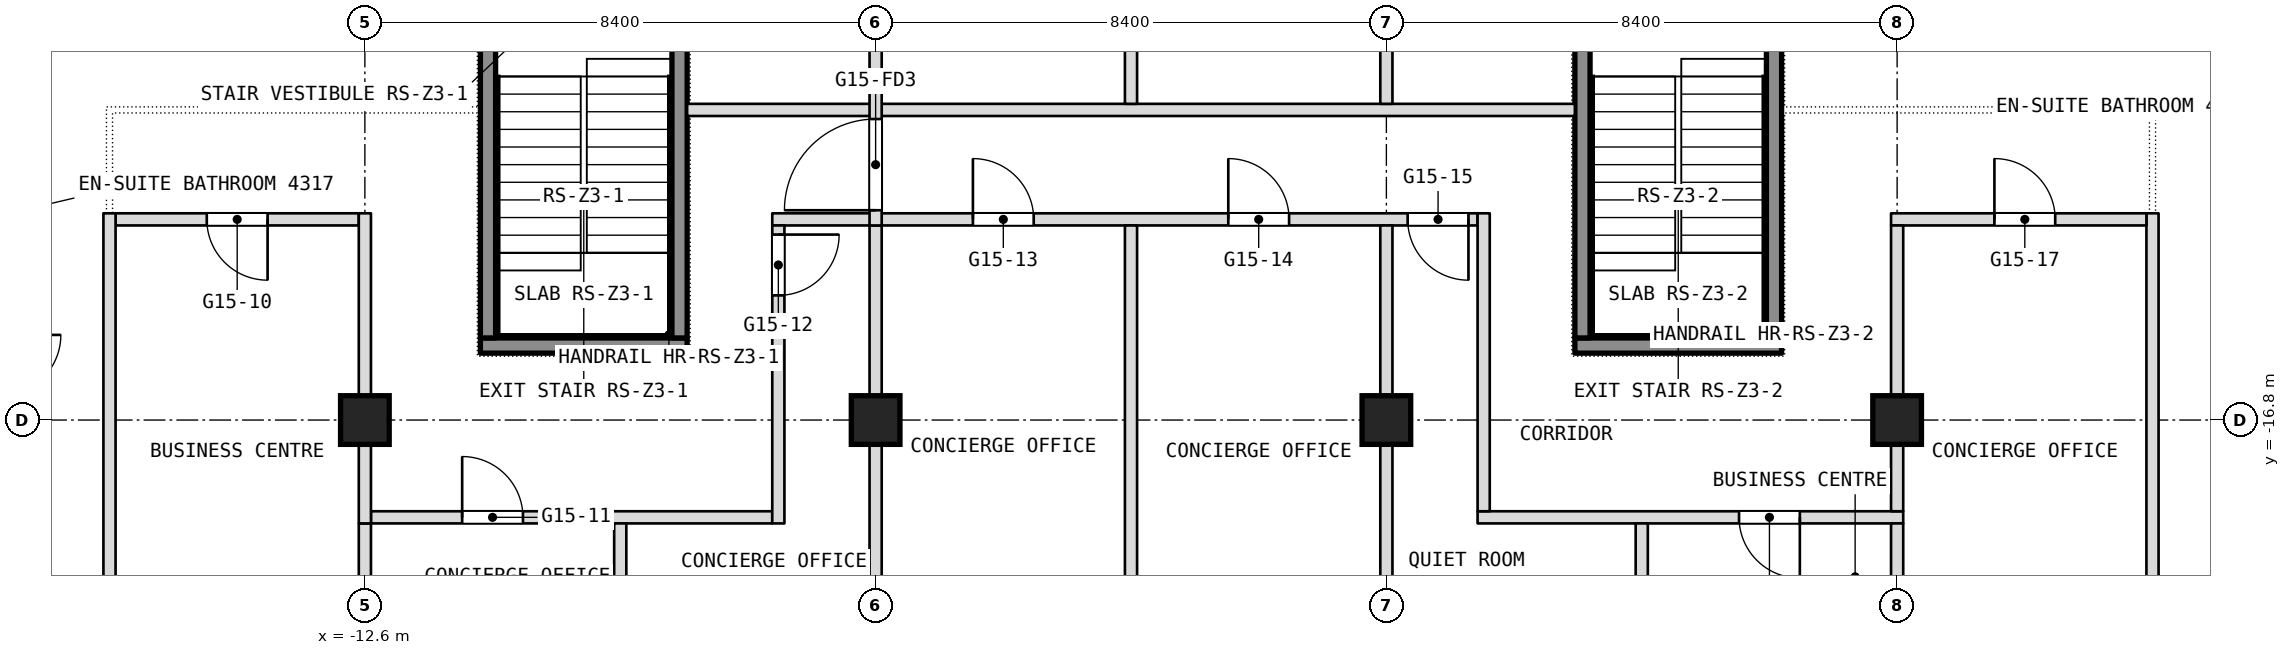
"""IFC4 building model, lengths in metres.
Left out: names, types, materials, properties, quantities, classifications, styles, units other than length and angle.
Written with IfcOpenShell. Run it as: python <this file> out.ifc"""

import sys

from ifc_helpers import new_model, si_unit, direction, frame, frame_2d, origin, origin_2d, place, context, subcontext, project, spatial, rectangle, extrude, element, fill, save


model = new_model("IFC4")
c1 = context("Model", 3, precision=1e-05, world=origin(), true_north=direction((0.0, 1.0)))
c2 = subcontext(c1, "Body", "Model", "MODEL_VIEW")
j1 = project(units=[si_unit("LENGTHUNIT", "METRE"), si_unit("PLANEANGLEUNIT", "RADIAN")], contexts=[c1])
p1 = place(None, origin())
s1 = spatial("IfcSite", under=j1, at=p1, CompositionType="ELEMENT")
p2 = place(p1, origin())
s2 = spatial("IfcBuilding", under=s1, at=p2, CompositionType="ELEMENT")
p3 = place(p2, frame((0.0, 0.0, 191.3)))
s3 = spatial("IfcBuildingStorey", under=s2, at=p3, CompositionType="ELEMENT", Elevation=191.3)
for number, where, z_axis, x_axis in (
    (1, (-12.6, -16.8, 0.0), (0.0, 0.0, 1.0), (1.0, 0.0, 0.0)),
    (2, (-4.2, -16.8, 0.0), (0.0, 0.0, 1.0), (1.0, 0.0, 0.0)),
    (3, (4.2, -16.8, 0.0), (0.0, 0.0, 1.0), (1.0, 0.0, 0.0)),
    (4, (12.6, -16.8, 0.0), (0.0, 0.0, 1.0), (1.0, 0.0, 0.0)),
):
    element("IfcColumn", number, at=place(p3, frame(where, z_axis=z_axis, x_axis=x_axis)), inside=s3, PredefinedType="COLUMN", context=c2, shape_type="SweptSolid", body=[
        extrude(rectangle(XDim=0.8, YDim=0.8, at=origin_2d()), origin(), (0.0, 0.0, 1.0), 3.6),
    ])
p4 = place(p3, frame((-12.5, -18.4, 0.0), z_axis=(0.0, 0.0, 1.0), x_axis=(1.0, 0.0, 0.0)))
e5 = element("IfcWall", 5, at=p4, inside=s3, PredefinedType="PARTITIONING", context=c2, shape_type="SweptSolid", body=[
    extrude(rectangle(XDim=6.6, YDim=0.2, at=frame_2d((3.3, 0.0))), origin(), (0.0, 0.0, 1.0), 3.34),
])
p5 = place(p4, frame((1.5, 0.0, 0.0)))
e6 = element("IfcOpeningElement", 6, at=p5, cuts=e5, PredefinedType="OPENING", context=c2, shape_type="SweptSolid", body=[
    extrude(rectangle(XDim=1.0, YDim=2.1, at=frame_2d((0.5, 1.05))), frame((0.0, 0.1, 0.0), z_axis=(0.0, -1.0, 0.0), x_axis=(1.0, 0.0, 0.0)), (0.0, 0.0, 1.0), 0.2),
])
p6 = place(p3, frame((5.7, -18.4, 0.0), z_axis=(0.0, 0.0, 1.0), x_axis=(1.0, 0.0, 0.0)))
e7 = element("IfcWall", 7, at=p6, inside=s3, PredefinedType="PARTITIONING", context=c2, shape_type="SweptSolid", body=[
    extrude(rectangle(XDim=7.0, YDim=0.2, at=frame_2d((3.5, 0.0))), origin(), (0.0, 0.0, 1.0), 3.34),
])
p7 = place(p6, frame((4.3, 0.0, 0.0)))
e8 = element("IfcOpeningElement", 8, at=p7, cuts=e7, PredefinedType="OPENING", context=c2, shape_type="SweptSolid", body=[
    extrude(rectangle(XDim=1.0, YDim=2.1, at=frame_2d((0.5, 1.05))), frame((0.0, 0.1, 0.0), z_axis=(0.0, -1.0, 0.0), x_axis=(1.0, 0.0, 0.0)), (0.0, 0.0, 1.0), 0.2),
])
p8 = place(p3, frame((16.8, -20.2, 0.0), z_axis=(0.0, 0.0, 1.0), x_axis=(0.0, 1.0, 0.0)))
e9 = element("IfcWall", 9, at=p8, inside=s3, PredefinedType="PARTITIONING", context=c2, shape_type="SweptSolid", body=[
    extrude(rectangle(XDim=6.8, YDim=0.2, at=frame_2d((3.4, 0.0))), origin(), (0.0, 0.0, 1.0), 3.34),
])
p9 = place(p3, frame((-16.7, -13.5, 0.0), z_axis=(0.0, 0.0, 1.0), x_axis=(1.0, 0.0, 0.0)))
e10 = element("IfcWall", 10, at=p9, inside=s3, PredefinedType="PARTITIONING", context=c2, shape_type="SweptSolid", body=[
    extrude(rectangle(XDim=4.0, YDim=0.2, at=frame_2d((2.0, 0.0))), origin(), (0.0, 0.0, 1.0), 3.34),
])
p10 = place(p9, frame((1.5, 0.0, 0.0)))
e11 = element("IfcOpeningElement", 11, at=p10, cuts=e10, PredefinedType="OPENING", context=c2, shape_type="SweptSolid", body=[
    extrude(rectangle(XDim=1.0, YDim=2.1, at=frame_2d((0.5, 1.05))), frame((0.0, 0.1, 0.0), z_axis=(0.0, -1.0, 0.0), x_axis=(1.0, 0.0, 0.0)), (0.0, 0.0, 1.0), 0.2),
])
p11 = place(p3, frame((-5.9, -13.5, 0.0), z_axis=(0.0, 0.0, 1.0), x_axis=(1.0, 0.0, 0.0)))
e12 = element("IfcWall", 12, at=p11, inside=s3, PredefinedType="PARTITIONING", context=c2, shape_type="SweptSolid", body=[
    extrude(rectangle(XDim=11.6, YDim=0.2, at=frame_2d((5.8, 0.0))), origin(), (0.0, 0.0, 1.0), 3.34),
])
p12 = place(p11, frame((3.3, 0.0, 0.0)))
e13 = element("IfcOpeningElement", 13, at=p12, cuts=e12, PredefinedType="OPENING", context=c2, shape_type="SweptSolid", body=[
    extrude(rectangle(XDim=1.0, YDim=2.1, at=frame_2d((0.5, 1.05))), frame((0.0, 0.1, 0.0), z_axis=(0.0, -1.0, 0.0), x_axis=(1.0, 0.0, 0.0)), (0.0, 0.0, 1.0), 0.2),
])
p13 = place(p11, frame((7.5, 0.0, 0.0)))
e14 = element("IfcOpeningElement", 14, at=p13, cuts=e12, PredefinedType="OPENING", context=c2, shape_type="SweptSolid", body=[
    extrude(rectangle(XDim=1.0, YDim=2.1, at=frame_2d((0.5, 1.05))), frame((0.0, 0.1, 0.0), z_axis=(0.0, -1.0, 0.0), x_axis=(1.0, 0.0, 0.0)), (0.0, 0.0, 1.0), 0.2),
])
p14 = place(p11, frame((10.45, 0.0, 0.0)))
e15 = element("IfcOpeningElement", 15, at=p14, cuts=e12, PredefinedType="OPENING", context=c2, shape_type="SweptSolid", body=[
    extrude(rectangle(XDim=1.0, YDim=2.1, at=frame_2d((0.5, 1.05))), frame((0.0, 0.1, 0.0), z_axis=(0.0, -1.0, 0.0), x_axis=(1.0, 0.0, 0.0)), (0.0, 0.0, 1.0), 0.2),
])
p15 = place(p3, frame((12.5, -13.5, 0.0), z_axis=(0.0, 0.0, 1.0), x_axis=(1.0, 0.0, 0.0)))
e16 = element("IfcWall", 16, at=p15, inside=s3, PredefinedType="PARTITIONING", context=c2, shape_type="SweptSolid", body=[
    extrude(rectangle(XDim=4.2, YDim=0.2, at=frame_2d((2.1, 0.0))), origin(), (0.0, 0.0, 1.0), 3.34),
])
p16 = place(p15, frame((1.7, 0.0, 0.0)))
e17 = element("IfcOpeningElement", 17, at=p16, cuts=e16, PredefinedType="OPENING", context=c2, shape_type="SweptSolid", body=[
    extrude(rectangle(XDim=1.0, YDim=2.1, at=frame_2d((0.5, 1.05))), frame((0.0, 0.1, 0.0), z_axis=(0.0, -1.0, 0.0), x_axis=(1.0, 0.0, 0.0)), (0.0, 0.0, 1.0), 0.2),
])
p17 = place(p3, frame((12.6, -20.0, 0.0), z_axis=(0.0, 0.0, 1.0), x_axis=(0.0, 1.0, 0.0)))
e18 = element("IfcWall", 18, at=p17, inside=s3, PredefinedType="PARTITIONING", context=c2, shape_type="SweptSolid", body=[
    extrude(rectangle(XDim=1.5, YDim=0.2, at=frame_2d((0.75, 0.0))), origin(), (0.0, 0.0, 1.0), 3.34),
])
p18 = place(p3, frame((12.6, -18.3, 0.0), z_axis=(0.0, 0.0, 1.0), x_axis=(0.0, 1.0, 0.0)))
e19 = element("IfcWall", 19, at=p18, inside=s3, PredefinedType="PARTITIONING", context=c2, shape_type="SweptSolid", body=[
    extrude(rectangle(XDim=4.7, YDim=0.2, at=frame_2d((2.35, 0.0))), origin(), (0.0, 0.0, 1.0), 3.34),
])
p19 = place(p3, frame((-7.3, -11.7, 0.0), z_axis=(0.0, 0.0, 1.0), x_axis=(1.0, 0.0, 0.0)))
e20 = element("IfcWall", 20, at=p19, inside=s3, PredefinedType="PARTITIONING", context=c2, shape_type="SweptSolid", body=[
    extrude(rectangle(XDim=14.6, YDim=0.2, at=frame_2d((7.3, 0.0))), origin(), (0.0, 0.0, 1.0), 3.34),
])
p20 = place(p3, frame((8.4, -20.0, 0.0), z_axis=(0.0, 0.0, 1.0), x_axis=(0.0, 1.0, 0.0)))
e21 = element("IfcWall", 21, at=p20, inside=s3, PredefinedType="PARTITIONING", context=c2, shape_type="SweptSolid", body=[
    extrude(rectangle(XDim=1.5, YDim=0.2, at=frame_2d((0.75, 0.0))), origin(), (0.0, 0.0, 1.0), 3.34),
])
p21 = place(p3, frame((5.8, -18.3, 0.0), z_axis=(0.0, 0.0, 1.0), x_axis=(0.0, 1.0, 0.0)))
e22 = element("IfcWall", 22, at=p21, inside=s3, PredefinedType="PARTITIONING", context=c2, shape_type="SweptSolid", body=[
    extrude(rectangle(XDim=4.9, YDim=0.2, at=frame_2d((2.45, 0.0))), origin(), (0.0, 0.0, 1.0), 3.34),
])
p22 = place(p3, frame((4.2, -20.0, 0.0), z_axis=(0.0, 0.0, 1.0), x_axis=(0.0, 1.0, 0.0)))
e23 = element("IfcWall", 23, at=p22, inside=s3, PredefinedType="PARTITIONING", context=c2, shape_type="SweptSolid", body=[
    extrude(rectangle(XDim=6.4, YDim=0.2, at=frame_2d((3.2, 0.0))), origin(), (0.0, 0.0, 1.0), 3.34),
])
p23 = place(p3, frame((4.2, -11.6, 0.0), z_axis=(0.0, 0.0, 1.0), x_axis=(0.0, 1.0, 0.0)))
e24 = element("IfcWall", 24, at=p23, inside=s3, PredefinedType="PARTITIONING", context=c2, shape_type="SweptSolid", body=[
    extrude(rectangle(XDim=9.7, YDim=0.2, at=frame_2d((4.85, 0.0))), origin(), (0.0, 0.0, 1.0), 3.34),
])
p24 = place(p3, frame((0.0, -20.0, 0.0), z_axis=(0.0, 0.0, 1.0), x_axis=(0.0, 1.0, 0.0)))
e25 = element("IfcWall", 25, at=p24, inside=s3, PredefinedType="PARTITIONING", context=c2, shape_type="SweptSolid", body=[
    extrude(rectangle(XDim=6.4, YDim=0.2, at=frame_2d((3.2, 0.0))), origin(), (0.0, 0.0, 1.0), 3.34),
])
p25 = place(p3, frame((0.0, -11.6, 0.0), z_axis=(0.0, 0.0, 1.0), x_axis=(0.0, 1.0, 0.0)))
e26 = element("IfcWall", 26, at=p25, inside=s3, PredefinedType="PARTITIONING", context=c2, shape_type="SweptSolid", body=[
    extrude(rectangle(XDim=9.7, YDim=0.2, at=frame_2d((4.85, 0.0))), origin(), (0.0, 0.0, 1.0), 3.34),
])
p26 = place(p3, frame((-4.2, -22.0, 0.0), z_axis=(0.0, 0.0, 1.0), x_axis=(0.0, 1.0, 0.0)))
e27 = element("IfcWall", 27, at=p26, inside=s3, PredefinedType="PARTITIONING", context=c2, shape_type="SweptSolid", body=[
    extrude(rectangle(XDim=8.4, YDim=0.2, at=frame_2d((4.2, 0.0))), origin(), (0.0, 0.0, 1.0), 3.34),
])
p27 = place(p26, frame((0.25, 0.0, 0.0)))
e28 = element("IfcOpeningElement", 28, at=p27, cuts=e27, PredefinedType="OPENING", context=c2, shape_type="SweptSolid", body=[
    extrude(rectangle(XDim=1.5, YDim=2.1, at=frame_2d((0.75, 1.05))), frame((0.0, 0.1, 0.0), z_axis=(0.0, -1.0, 0.0), x_axis=(1.0, 0.0, 0.0)), (0.0, 0.0, 1.0), 0.2),
])
p28 = place(p3, frame((-4.2, -13.6, 0.0), z_axis=(0.0, 0.0, 1.0), x_axis=(0.0, 1.0, 0.0)))
e29 = element("IfcWall", 29, at=p28, inside=s3, PredefinedType="PARTITIONING", context=c2, shape_type="SweptSolid", body=[
    extrude(rectangle(XDim=13.6, YDim=0.2, at=frame_2d((6.8, 0.0))), origin(), (0.0, 0.0, 1.0), 3.34),
])
p29 = place(p28, frame((11.95, 0.0, 0.0)))
e30 = element("IfcOpeningElement", 30, at=p29, cuts=e29, PredefinedType="OPENING", context=c2, shape_type="SweptSolid", body=[
    extrude(rectangle(XDim=1.5, YDim=2.1, at=frame_2d((0.75, 1.05))), frame((0.0, 0.1, 0.0), z_axis=(0.0, -1.0, 0.0), x_axis=(1.0, 0.0, 0.0)), (0.0, 0.0, 1.0), 0.2),
])
p30 = place(p28, frame((0.25, 0.0, 0.0)))
e31 = element("IfcOpeningElement", 31, at=p30, cuts=e29, PredefinedType="OPENING", context=c2, shape_type="SweptSolid", body=[
    extrude(rectangle(XDim=1.5, YDim=2.1, at=frame_2d((0.75, 1.05))), frame((0.0, 0.1, 0.0), z_axis=(0.0, -1.0, 0.0), x_axis=(1.0, 0.0, 0.0)), (0.0, 0.0, 1.0), 0.2),
])
p31 = place(p3, frame((-5.8, -18.5, 0.0), z_axis=(0.0, 0.0, 1.0), x_axis=(0.0, 1.0, 0.0)))
e32 = element("IfcWall", 32, at=p31, inside=s3, PredefinedType="PARTITIONING", context=c2, shape_type="SweptSolid", body=[
    extrude(rectangle(XDim=4.9, YDim=0.2, at=frame_2d((2.45, 0.0))), origin(), (0.0, 0.0, 1.0), 3.34),
])
p32 = place(p31, frame((3.75, 0.0, 0.0)))
e33 = element("IfcOpeningElement", 33, at=p32, cuts=e32, PredefinedType="OPENING", context=c2, shape_type="SweptSolid", body=[
    extrude(rectangle(XDim=1.0, YDim=2.1, at=frame_2d((0.5, 1.05))), frame((0.0, 0.1, 0.0), z_axis=(0.0, -1.0, 0.0), x_axis=(1.0, 0.0, 0.0)), (0.0, 0.0, 1.0), 0.2),
])
for number, where, z_axis, x_axis in (
    (34, (-8.4, -20.0, 0.0), (0.0, 0.0, 1.0), (0.0, 1.0, 0.0)),
    (35, (-12.6, -20.0, 0.0), (0.0, 0.0, 1.0), (0.0, 1.0, 0.0)),
):
    element("IfcWall", number, at=place(p3, frame(where, z_axis=z_axis, x_axis=x_axis)), inside=s3, PredefinedType="PARTITIONING", context=c2, shape_type="SweptSolid", body=[
        extrude(rectangle(XDim=1.5, YDim=0.2, at=frame_2d((0.75, 0.0))), origin(), (0.0, 0.0, 1.0), 3.34),
    ])
p33 = place(p3, frame((-12.6, -18.5, 0.0), z_axis=(0.0, 0.0, 1.0), x_axis=(0.0, 1.0, 0.0)))
e36 = element("IfcWall", 36, at=p33, inside=s3, PredefinedType="PARTITIONING", context=c2, shape_type="SweptSolid", body=[
    extrude(rectangle(XDim=5.1, YDim=0.2, at=frame_2d((2.55, 0.0))), origin(), (0.0, 0.0, 1.0), 3.34),
])
p34 = place(p3, frame((-16.8, -20.2, 0.0), z_axis=(0.0, 0.0, 1.0), x_axis=(0.0, 1.0, 0.0)))
e37 = element("IfcWall", 37, at=p34, inside=s3, PredefinedType="PARTITIONING", context=c2, shape_type="SweptSolid", body=[
    extrude(rectangle(XDim=6.8, YDim=0.2, at=frame_2d((3.4, 0.0))), origin(), (0.0, 0.0, 1.0), 3.34),
])
p35 = place(p3, frame((-10.7, -15.575, 0.1), z_axis=(0.0, 0.0, 1.0), x_axis=(1.0, 0.0, 0.0)))
e38 = element("IfcWall", 38, at=p35, inside=s3, PredefinedType="SHEAR", context=c2, shape_type="SweptSolid", body=[
    extrude(rectangle(XDim=3.4, YDim=0.25, at=frame_2d((1.7, 0.0))), origin(), (0.0, 0.0, 1.0), 3.6),
])
for number, where, z_axis, x_axis in (
    (39, (-10.575, -15.45, 0.1), (0.0, 0.0, 1.0), (0.0, 1.0, 0.0)),
    (40, (-7.425, -15.45, 0.1), (0.0, 0.0, 1.0), (0.0, 1.0, 0.0)),
):
    element("IfcWall", number, at=place(p3, frame(where, z_axis=z_axis, x_axis=x_axis)), inside=s3, PredefinedType="SHEAR", context=c2, shape_type="SweptSolid", body=[
        extrude(rectangle(XDim=5.7, YDim=0.25, at=frame_2d((2.85, 0.0))), origin(), (0.0, 0.0, 1.0), 3.6),
    ])
p36 = place(p3, frame((7.3, -15.575, 0.1), z_axis=(0.0, 0.0, 1.0), x_axis=(1.0, 0.0, 0.0)))
e41 = element("IfcWall", 41, at=p36, inside=s3, PredefinedType="SHEAR", context=c2, shape_type="SweptSolid", body=[
    extrude(rectangle(XDim=3.4, YDim=0.25, at=frame_2d((1.7, 0.0))), origin(), (0.0, 0.0, 1.0), 3.6),
])
for number, where, z_axis, x_axis in (
    (42, (7.425, -15.45, 0.1), (0.0, 0.0, 1.0), (0.0, 1.0, 0.0)),
    (43, (10.575, -15.45, 0.1), (0.0, 0.0, 1.0), (0.0, 1.0, 0.0)),
):
    element("IfcWall", number, at=place(p3, frame(where, z_axis=z_axis, x_axis=x_axis)), inside=s3, PredefinedType="SHEAR", context=c2, shape_type="SweptSolid", body=[
        extrude(rectangle(XDim=5.7, YDim=0.25, at=frame_2d((2.85, 0.0))), origin(), (0.0, 0.0, 1.0), 3.6),
    ])
p37 = place(p5, origin())
e44 = element("IfcDoor", 44, at=p37, inside=s3, OperationType="SINGLE_SWING_RIGHT", PredefinedType="DOOR", context=c2, shape_type="SweptSolid", body=[
    extrude(rectangle(XDim=1.0, YDim=2.1, at=frame_2d((0.5, 1.05))), frame((0.0, 0.025, 0.0), z_axis=(0.0, -1.0, 0.0), x_axis=(1.0, 0.0, 0.0)), (0.0, 0.0, 1.0), 0.05),
])
fill(e6, e44)
p38 = place(p7, origin())
e45 = element("IfcDoor", 45, at=p38, inside=s3, OperationType="SINGLE_SWING_LEFT", PredefinedType="DOOR", context=c2, shape_type="SweptSolid", body=[
    extrude(rectangle(XDim=1.0, YDim=2.1, at=frame_2d((0.5, 1.05))), frame((0.0, 0.025, 0.0), z_axis=(0.0, -1.0, 0.0), x_axis=(1.0, 0.0, 0.0)), (0.0, 0.0, 1.0), 0.05),
])
fill(e8, e45)
p39 = place(p10, origin())
e46 = element("IfcDoor", 46, at=p39, inside=s3, OperationType="SINGLE_SWING_RIGHT", PredefinedType="DOOR", context=c2, shape_type="SweptSolid", body=[
    extrude(rectangle(XDim=1.0, YDim=2.1, at=frame_2d((0.5, 1.05))), frame((0.0, 0.025, 0.0), z_axis=(0.0, -1.0, 0.0), x_axis=(1.0, 0.0, 0.0)), (0.0, 0.0, 1.0), 0.05),
])
fill(e11, e46)
p40 = place(p12, origin())
e47 = element("IfcDoor", 47, at=p40, inside=s3, OperationType="SINGLE_SWING_LEFT", PredefinedType="DOOR", context=c2, shape_type="SweptSolid", body=[
    extrude(rectangle(XDim=1.0, YDim=2.1, at=frame_2d((0.5, 1.05))), frame((0.0, 0.025, 0.0), z_axis=(0.0, -1.0, 0.0), x_axis=(1.0, 0.0, 0.0)), (0.0, 0.0, 1.0), 0.05),
])
fill(e13, e47)
p41 = place(p13, origin())
e48 = element("IfcDoor", 48, at=p41, inside=s3, OperationType="SINGLE_SWING_RIGHT", PredefinedType="DOOR", context=c2, shape_type="SweptSolid", body=[
    extrude(rectangle(XDim=1.0, YDim=2.1, at=frame_2d((0.5, 1.05))), frame((0.0, 0.025, 0.0), z_axis=(0.0, -1.0, 0.0), x_axis=(1.0, 0.0, 0.0)), (0.0, 0.0, 1.0), 0.05),
])
fill(e14, e48)
p42 = place(p14, origin())
e49 = element("IfcDoor", 49, at=p42, inside=s3, OperationType="SINGLE_SWING_LEFT", PredefinedType="DOOR", context=c2, shape_type="SweptSolid", body=[
    extrude(rectangle(XDim=1.0, YDim=2.1, at=frame_2d((0.5, 1.05))), frame((0.0, 0.025, 0.0), z_axis=(0.0, -1.0, 0.0), x_axis=(1.0, 0.0, 0.0)), (0.0, 0.0, 1.0), 0.05),
])
fill(e15, e49)
p43 = place(p16, origin())
e50 = element("IfcDoor", 50, at=p43, inside=s3, OperationType="SINGLE_SWING_LEFT", PredefinedType="DOOR", context=c2, shape_type="SweptSolid", body=[
    extrude(rectangle(XDim=1.0, YDim=2.1, at=frame_2d((0.5, 1.05))), frame((0.0, 0.025, 0.0), z_axis=(0.0, -1.0, 0.0), x_axis=(1.0, 0.0, 0.0)), (0.0, 0.0, 1.0), 0.05),
])
fill(e17, e50)
p44 = place(p32, origin())
e51 = element("IfcDoor", 51, at=p44, inside=s3, OperationType="SINGLE_SWING_RIGHT", PredefinedType="DOOR", context=c2, shape_type="SweptSolid", body=[
    extrude(rectangle(XDim=1.0, YDim=2.1, at=frame_2d((0.5, 1.05))), frame((0.0, 0.025, 0.0), z_axis=(0.0, -1.0, 0.0), x_axis=(1.0, 0.0, 0.0)), (0.0, 0.0, 1.0), 0.05),
])
fill(e33, e51)
p45 = place(p30, origin())
e52 = element("IfcDoor", 52, at=p45, inside=s3, OperationType="DOUBLE_DOOR_DOUBLE_SWING", PredefinedType="DOOR", context=c2, shape_type="SweptSolid", body=[
    extrude(rectangle(XDim=1.5, YDim=2.1, at=frame_2d((0.75, 1.05))), frame((0.0, 0.025, 0.0), z_axis=(0.0, -1.0, 0.0), x_axis=(1.0, 0.0, 0.0)), (0.0, 0.0, 1.0), 0.05),
])
fill(e31, e52)
save(model, sys.argv[1])
